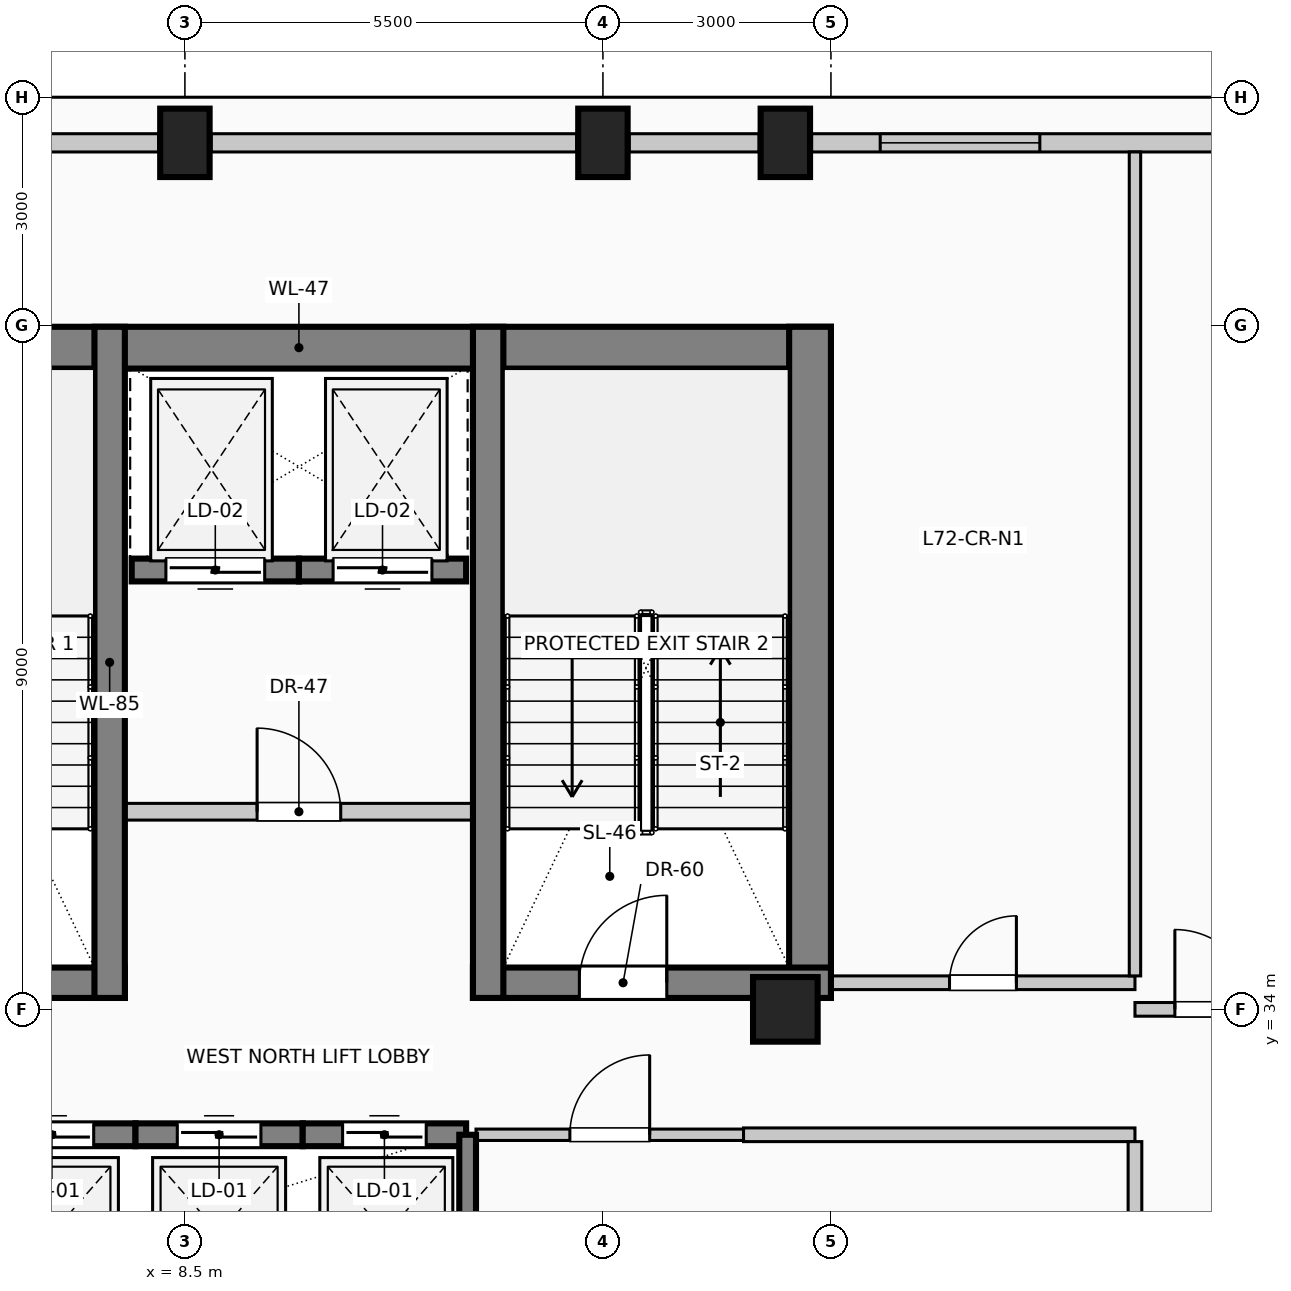
"""IFC4 building model, lengths in metres.
Left out: names, types, materials, properties, quantities, classifications, styles, units other than length and angle.
Written with IfcOpenShell. Run it as: python <this file> out.ifc"""

import sys

from ifc_helpers import new_model, si_unit, direction, frame, frame_2d, origin, origin_2d, place, context, subcontext, project, spatial, rectangle, circle, extrude, element, fill, save


model = new_model("IFC4")
c1 = context("Model", 3, precision=1e-05, world=origin(), true_north=direction((0.0, 1.0)))
c2 = subcontext(c1, "Body", "Model", "MODEL_VIEW")
j1 = project(units=[si_unit("LENGTHUNIT", "METRE"), si_unit("PLANEANGLEUNIT", "RADIAN")], contexts=[c1])
p1 = place(None, origin())
s1 = spatial("IfcSite", under=j1, at=p1, CompositionType="ELEMENT")
p2 = place(p1, origin())
s2 = spatial("IfcBuilding", under=s1, at=p2, CompositionType="ELEMENT")
p3 = place(p2, frame((0.0, 0.0, 297.0)))
s3 = spatial("IfcBuildingStorey", under=s2, at=p3, CompositionType="ELEMENT", Elevation=297.0)
p4 = place(p3, frame((3.0, 42.705, 0.0), z_axis=(0.0, 0.0, 1.0), x_axis=(1.0, 0.0, 0.0)))
e1 = element("IfcWall", 1, at=p4, inside=s3, PredefinedType="SHEAR", context=c2, shape_type="SweptSolid", body=[
    extrude(rectangle(XDim=14.0, YDim=0.55, at=frame_2d((7.0, 0.0))), origin(), (0.0, 0.0, 1.0), 4.0),
])
p5 = place(p3, frame((16.725, 34.15, 0.0), z_axis=(0.0, 0.0, 1.0), x_axis=(0.0, 1.0, 0.0)))
e2 = element("IfcWall", 2, at=p5, inside=s3, PredefinedType="SHEAR", context=c2, shape_type="SweptSolid", body=[
    extrude(rectangle(XDim=8.83, YDim=0.55, at=frame_2d((4.415, 0.0))), origin(), (0.0, 0.0, 1.0), 4.0),
])
p6 = place(p3, frame((3.0, 34.35, 0.0), z_axis=(0.0, 0.0, 1.0), x_axis=(1.0, 0.0, 0.0)))
e3 = element("IfcWall", 3, at=p6, inside=s3, PredefinedType="SHEAR", context=c2, shape_type="SweptSolid", body=[
    extrude(rectangle(XDim=4.71, YDim=0.4, at=frame_2d((2.355, 0.0))), origin(), (0.0, 0.0, 1.0), 4.0),
])
p7 = place(p6, frame((2.4, 0.0, 0.0)))
e4 = element("IfcOpeningElement", 4, at=p7, cuts=e3, PredefinedType="OPENING", context=c2, shape_type="SweptSolid", body=[
    extrude(rectangle(XDim=1.15, YDim=2.2, at=frame_2d((0.575, 1.1))), frame((0.0, 0.21, 0.0), z_axis=(0.0, -1.0, 0.0), x_axis=(1.0, 0.0, 0.0)), (0.0, 0.0, 1.0), 0.42),
])
p8 = place(p3, frame((12.29, 34.35, 0.0), z_axis=(0.0, 0.0, 1.0), x_axis=(1.0, 0.0, 0.0)))
e5 = element("IfcWall", 5, at=p8, inside=s3, PredefinedType="SHEAR", context=c2, shape_type="SweptSolid", body=[
    extrude(rectangle(XDim=4.71, YDim=0.4, at=frame_2d((2.355, 0.0))), origin(), (0.0, 0.0, 1.0), 4.0),
])
p9 = place(p8, frame((1.4, 0.0, 0.0)))
e6 = element("IfcOpeningElement", 6, at=p9, cuts=e5, PredefinedType="OPENING", context=c2, shape_type="SweptSolid", body=[
    extrude(rectangle(XDim=1.15, YDim=2.2, at=frame_2d((0.575, 1.1))), frame((0.0, 0.21, 0.0), z_axis=(0.0, -1.0, 0.0), x_axis=(1.0, 0.0, 0.0)), (0.0, 0.0, 1.0), 0.42),
])
for number, where, z_axis, x_axis in (
    (7, (7.51, 34.15, 0.0), (0.0, 0.0, 1.0), (0.0, 1.0, 0.0)),
    (8, (12.49, 34.15, 0.0), (0.0, 0.0, 1.0), (0.0, 1.0, 0.0)),
):
    element("IfcWall", number, at=place(p3, frame(where, z_axis=z_axis, x_axis=x_axis)), inside=s3, PredefinedType="SHEAR", context=c2, shape_type="SweptSolid", body=[
        extrude(rectangle(XDim=8.83, YDim=0.4, at=frame_2d((4.415, 0.0))), origin(), (0.0, 0.0, 1.0), 4.0),
    ])
for number, where, z_axis, x_axis in (
    (9, (8.5, 45.4, 0.0), (0.0, 0.0, 1.0), (1.0, 0.0, 0.0)),
    (10, (14.0, 45.4, 0.0), (0.0, 0.0, 1.0), (1.0, 0.0, 0.0)),
    (11, (16.4, 45.4, 0.0), (0.0, 0.0, 1.0), (1.0, 0.0, 0.0)),
):
    element("IfcColumn", number, at=place(p3, frame(where, z_axis=z_axis, x_axis=x_axis)), inside=s3, PredefinedType="COLUMN", context=c2, shape_type="SweptSolid", body=[
        extrude(rectangle(XDim=0.65, YDim=0.9, at=origin_2d()), origin(), (0.0, 0.0, 1.0), 4.0),
    ])
p10 = place(p3, frame((16.4, 34.0, 0.0), z_axis=(0.0, 0.0, 1.0), x_axis=(1.0, 0.0, 0.0)))
e12 = element("IfcColumn", 12, at=p10, inside=s3, PredefinedType="COLUMN", context=c2, shape_type="SweptSolid", body=[
    extrude(circle(Radius=0.425, at=origin_2d()), origin(), (0.0, 0.0, 1.0), 4.0),
])
p11 = place(p3, frame((3.945, 45.4, 0.0), z_axis=(0.0, 0.0, 1.0), x_axis=(1.0, 0.0, 0.0)))
e13 = element("IfcWall", 13, at=p11, inside=s3, PredefinedType="SOLIDWALL", context=c2, shape_type="SweptSolid", body=[
    extrude(rectangle(XDim=4.21, YDim=0.24, at=frame_2d((2.105, 0.0))), origin(), (0.0, 0.0, 1.0), 3.025),
])
p12 = place(p3, frame((8.845, 45.4, 0.0), z_axis=(0.0, 0.0, 1.0), x_axis=(1.0, 0.0, 0.0)))
e14 = element("IfcWall", 14, at=p12, inside=s3, PredefinedType="SOLIDWALL", context=c2, shape_type="SweptSolid", body=[
    extrude(rectangle(XDim=4.81, YDim=0.24, at=frame_2d((2.405, 0.0))), origin(), (0.0, 0.0, 1.0), 3.025),
])
p13 = place(p3, frame((14.345, 45.4, 0.0), z_axis=(0.0, 0.0, 1.0), x_axis=(1.0, 0.0, 0.0)))
e15 = element("IfcWall", 15, at=p13, inside=s3, PredefinedType="SOLIDWALL", context=c2, shape_type="SweptSolid", body=[
    extrude(rectangle(XDim=1.71, YDim=0.24, at=frame_2d((0.855, 0.0))), origin(), (0.0, 0.0, 1.0), 3.025),
])
p14 = place(p3, frame((16.745, 45.4, 0.0), z_axis=(0.0, 0.0, 1.0), x_axis=(1.0, 0.0, 0.0)))
e16 = element("IfcWall", 16, at=p14, inside=s3, PredefinedType="SOLIDWALL", context=c2, shape_type="SweptSolid", body=[
    extrude(rectangle(XDim=6.91, YDim=0.24, at=frame_2d((3.455, 0.0))), origin(), (0.0, 0.0, 1.0), 3.025),
])
p15 = place(p14, frame((0.903, 0.0, 0.35)))
e17 = element("IfcOpeningElement", 17, at=p15, cuts=e16, PredefinedType="OPENING", context=c2, shape_type="SweptSolid", body=[
    extrude(rectangle(XDim=2.1, YDim=2.2, at=frame_2d((1.05, 1.1))), frame((0.0, 0.13, 0.0), z_axis=(0.0, -1.0, 0.0), x_axis=(1.0, 0.0, 0.0)), (0.0, 0.0, 1.0), 0.26),
])
p16 = place(p3, frame((5.65, 32.35, 0.0), z_axis=(0.0, 0.0, 1.0), x_axis=(1.0, 0.0, 0.0)))
e18 = element("IfcWall", 18, at=p16, inside=s3, PredefinedType="SOLIDWALL", context=c2, shape_type="SweptSolid", body=[
    extrude(rectangle(XDim=2.2, YDim=0.3, at=frame_2d((1.1, 0.0))), origin(), (0.0, 0.0, 1.0), 4.0),
])
p17 = place(p16, frame((0.55, 0.0, 0.0)))
e19 = element("IfcOpeningElement", 19, at=p17, cuts=e18, PredefinedType="OPENING", context=c2, shape_type="SweptSolid", body=[
    extrude(rectangle(XDim=1.1, YDim=2.2, at=frame_2d((0.55, 1.1))), frame((0.0, 0.16, 0.0), z_axis=(0.0, -1.0, 0.0), x_axis=(1.0, 0.0, 0.0)), (0.0, 0.0, 1.0), 0.32),
])
p18 = place(p3, frame((7.85, 32.35, 0.0), z_axis=(0.0, 0.0, 1.0), x_axis=(1.0, 0.0, 0.0)))
e20 = element("IfcWall", 20, at=p18, inside=s3, PredefinedType="SOLIDWALL", context=c2, shape_type="SweptSolid", body=[
    extrude(rectangle(XDim=2.2, YDim=0.3, at=frame_2d((1.1, 0.0))), origin(), (0.0, 0.0, 1.0), 4.0),
])
p19 = place(p18, frame((0.55, 0.0, 0.0)))
e21 = element("IfcOpeningElement", 21, at=p19, cuts=e20, PredefinedType="OPENING", context=c2, shape_type="SweptSolid", body=[
    extrude(rectangle(XDim=1.1, YDim=2.2, at=frame_2d((0.55, 1.1))), frame((0.0, 0.16, 0.0), z_axis=(0.0, -1.0, 0.0), x_axis=(1.0, 0.0, 0.0)), (0.0, 0.0, 1.0), 0.32),
])
p20 = place(p3, frame((10.05, 32.35, 0.0), z_axis=(0.0, 0.0, 1.0), x_axis=(1.0, 0.0, 0.0)))
e22 = element("IfcWall", 22, at=p20, inside=s3, PredefinedType="SOLIDWALL", context=c2, shape_type="SweptSolid", body=[
    extrude(rectangle(XDim=2.15, YDim=0.3, at=frame_2d((1.075, 0.0))), origin(), (0.0, 0.0, 1.0), 4.0),
])
p21 = place(p20, frame((0.525, 0.0, 0.0)))
e23 = element("IfcOpeningElement", 23, at=p21, cuts=e22, PredefinedType="OPENING", context=c2, shape_type="SweptSolid", body=[
    extrude(rectangle(XDim=1.1, YDim=2.2, at=frame_2d((0.55, 1.1))), frame((0.0, 0.16, 0.0), z_axis=(0.0, -1.0, 0.0), x_axis=(1.0, 0.0, 0.0)), (0.0, 0.0, 1.0), 0.32),
])
p22 = place(p3, frame((10.0, 39.78, 0.0), z_axis=(0.0, 0.0, 1.0), x_axis=(-1.0, 0.0, 0.0)))
e24 = element("IfcWall", 24, at=p22, inside=s3, PredefinedType="SOLIDWALL", context=c2, shape_type="SweptSolid", body=[
    extrude(rectangle(XDim=2.2, YDim=0.3, at=frame_2d((1.1, 0.0))), origin(), (0.0, 0.0, 1.0), 4.0),
])
p23 = place(p22, frame((0.45, 0.0, 0.0)))
e25 = element("IfcOpeningElement", 25, at=p23, cuts=e24, PredefinedType="OPENING", context=c2, shape_type="SweptSolid", body=[
    extrude(rectangle(XDim=1.3, YDim=2.25, at=frame_2d((0.65, 1.125))), frame((0.0, 0.16, 0.0), z_axis=(0.0, -1.0, 0.0), x_axis=(1.0, 0.0, 0.0)), (0.0, 0.0, 1.0), 0.32),
])
p24 = place(p3, frame((12.2, 39.78, 0.0), z_axis=(0.0, 0.0, 1.0), x_axis=(-1.0, 0.0, 0.0)))
e26 = element("IfcWall", 26, at=p24, inside=s3, PredefinedType="SOLIDWALL", context=c2, shape_type="SweptSolid", body=[
    extrude(rectangle(XDim=2.2, YDim=0.3, at=frame_2d((1.1, 0.0))), origin(), (0.0, 0.0, 1.0), 4.0),
])
p25 = place(p24, frame((0.45, 0.0, 0.0)))
e27 = element("IfcOpeningElement", 27, at=p25, cuts=e26, PredefinedType="OPENING", context=c2, shape_type="SweptSolid", body=[
    extrude(rectangle(XDim=1.3, YDim=2.25, at=frame_2d((0.65, 1.125))), frame((0.0, 0.16, 0.0), z_axis=(0.0, -1.0, 0.0), x_axis=(1.0, 0.0, 0.0)), (0.0, 0.0, 1.0), 0.32),
])
p26 = place(p3, frame((12.22, 29.75, 0.0), z_axis=(0.0, 0.0, 1.0), x_axis=(0.0, 1.0, 0.0)))
e28 = element("IfcWall", 28, at=p26, inside=s3, PredefinedType="SOLIDWALL", context=c2, shape_type="SweptSolid", body=[
    extrude(rectangle(XDim=2.6, YDim=0.22, at=frame_2d((1.3, 0.0))), origin(), (0.0, 0.0, 1.0), 4.0),
])
p27 = place(p3, frame((7.51, 36.6, 0.0), z_axis=(0.0, 0.0, 1.0), x_axis=(1.0, 0.0, 0.0)))
e29 = element("IfcWall", 29, at=p27, inside=s3, PredefinedType="PARTITIONING", context=c2, shape_type="SweptSolid", body=[
    extrude(rectangle(XDim=4.98, YDim=0.22, at=frame_2d((2.49, 0.0))), origin(), (0.0, 0.0, 1.0), 3.775),
])
p28 = place(p27, frame((1.94, 0.0, 0.0)))
e30 = element("IfcOpeningElement", 30, at=p28, cuts=e29, PredefinedType="OPENING", context=c2, shape_type="SweptSolid", body=[
    extrude(rectangle(XDim=1.1, YDim=2.2, at=frame_2d((0.55, 1.1))), frame((0.0, 0.12, 0.0), z_axis=(0.0, -1.0, 0.0), x_axis=(1.0, 0.0, 0.0)), (0.0, 0.0, 1.0), 0.24),
])
p29 = place(p3, frame((12.33, 32.35, 0.0), z_axis=(0.0, 0.0, 1.0), x_axis=(1.0, 0.0, 0.0)))
e31 = element("IfcWall", 31, at=p29, inside=s3, PredefinedType="PARTITIONING", context=c2, shape_type="SweptSolid", body=[
    extrude(rectangle(XDim=3.52, YDim=0.15, at=frame_2d((1.76, 0.0))), origin(), (0.0, 0.0, 1.0), 3.775),
])
p30 = place(p29, frame((1.235, 0.0, 0.0)))
e32 = element("IfcOpeningElement", 32, at=p30, cuts=e31, PredefinedType="OPENING", context=c2, shape_type="SweptSolid", body=[
    extrude(rectangle(XDim=1.05, YDim=2.15, at=frame_2d((0.525, 1.075))), frame((0.0, 0.085, 0.0), z_axis=(0.0, -1.0, 0.0), x_axis=(1.0, 0.0, 0.0)), (0.0, 0.0, 1.0), 0.17),
])
p31 = place(p3, frame((15.85, 32.35, 0.0), z_axis=(0.0, 0.0, 1.0), x_axis=(1.0, 0.0, 0.0)))
e33 = element("IfcWall", 33, at=p31, inside=s3, PredefinedType="PARTITIONING", context=c2, shape_type="SweptSolid", body=[
    extrude(rectangle(XDim=5.15, YDim=0.18, at=frame_2d((2.575, 0.0))), origin(), (0.0, 0.0, 1.0), 3.775),
])
p32 = place(p3, frame((21.0, 34.0, 0.0), z_axis=(0.0, 0.0, 1.0), x_axis=(1.0, 0.0, 0.0)))
e34 = element("IfcWall", 34, at=p32, inside=s3, PredefinedType="PARTITIONING", context=c2, shape_type="SweptSolid", body=[
    extrude(rectangle(XDim=2.1, YDim=0.18, at=frame_2d((1.05, 0.0))), origin(), (0.0, 0.0, 1.0), 3.27),
])
p33 = place(p32, frame((0.525, 0.0, 0.0)))
e35 = element("IfcOpeningElement", 35, at=p33, cuts=e34, PredefinedType="OPENING", context=c2, shape_type="SweptSolid", body=[
    extrude(rectangle(XDim=1.05, YDim=2.15, at=frame_2d((0.525, 1.075))), frame((0.0, 0.1, 0.0), z_axis=(0.0, -1.0, 0.0), x_axis=(1.0, 0.0, 0.0)), (0.0, 0.0, 1.0), 0.2),
])
p34 = place(p3, frame((17.0, 34.35, 0.0), z_axis=(0.0, 0.0, 1.0), x_axis=(1.0, 0.0, 0.0)))
e36 = element("IfcWall", 36, at=p34, inside=s3, PredefinedType="PARTITIONING", context=c2, shape_type="SweptSolid", body=[
    extrude(rectangle(XDim=4.0, YDim=0.18, at=frame_2d((2.0, 0.0))), origin(), (0.0, 0.0, 1.0), 3.775),
])
p35 = place(p34, frame((1.56, 0.0, 0.0)))
e37 = element("IfcOpeningElement", 37, at=p35, cuts=e36, PredefinedType="OPENING", context=c2, shape_type="SweptSolid", body=[
    extrude(rectangle(XDim=0.88, YDim=2.1, at=frame_2d((0.44, 1.05))), frame((0.0, 0.1, 0.0), z_axis=(0.0, -1.0, 0.0), x_axis=(1.0, 0.0, 0.0)), (0.0, 0.0, 1.0), 0.2),
])
p36 = place(p3, frame((21.0, 24.875, 0.0), z_axis=(0.0, 0.0, 1.0), x_axis=(0.0, 1.0, 0.0)))
e38 = element("IfcWall", 38, at=p36, inside=s3, PredefinedType="PARTITIONING", context=c2, shape_type="SweptSolid", body=[
    extrude(rectangle(XDim=7.385, YDim=0.18, at=frame_2d((3.692, 0.0))), origin(), (0.0, 0.0, 1.0), 3.775),
])
p37 = place(p3, frame((21.0, 34.44, 0.0), z_axis=(0.0, 0.0, 1.0), x_axis=(0.0, 1.0, 0.0)))
e39 = element("IfcWall", 39, at=p37, inside=s3, PredefinedType="PARTITIONING", context=c2, shape_type="SweptSolid", body=[
    extrude(rectangle(XDim=10.84, YDim=0.15, at=frame_2d((5.42, 0.0))), origin(), (0.0, 0.0, 1.0), 3.775),
])
p38 = place(p15, origin())
e40 = element("IfcWindow", 40, at=p38, inside=s3, PartitioningType="SINGLE_PANEL", PredefinedType="WINDOW", context=c2, shape_type="SweptSolid", body=[
    extrude(rectangle(XDim=2.1, YDim=2.2, at=frame_2d((1.05, 1.1))), frame((0.0, 0.03, 0.0), z_axis=(0.0, -1.0, 0.0), x_axis=(1.0, 0.0, 0.0)), (0.0, 0.0, 1.0), 0.06),
])
fill(e17, e40)
p39 = place(p17, origin())
e41 = element("IfcDoor", 41, at=p39, inside=s3, OperationType="SLIDING_TO_RIGHT", PredefinedType="DOOR", context=c2, shape_type="SweptSolid", body=[
    extrude(rectangle(XDim=1.1, YDim=2.2, at=frame_2d((0.55, 1.1))), frame((0.0, 0.025, 0.0), z_axis=(0.0, -1.0, 0.0), x_axis=(1.0, 0.0, 0.0)), (0.0, 0.0, 1.0), 0.05),
])
fill(e19, e41)
p40 = place(p19, origin())
e42 = element("IfcDoor", 42, at=p40, inside=s3, OperationType="SLIDING_TO_LEFT", PredefinedType="DOOR", context=c2, shape_type="SweptSolid", body=[
    extrude(rectangle(XDim=1.1, YDim=2.2, at=frame_2d((0.55, 1.1))), frame((0.0, 0.025, 0.0), z_axis=(0.0, -1.0, 0.0), x_axis=(1.0, 0.0, 0.0)), (0.0, 0.0, 1.0), 0.05),
])
fill(e21, e42)
p41 = place(p21, origin())
e43 = element("IfcDoor", 43, at=p41, inside=s3, OperationType="SLIDING_TO_RIGHT", PredefinedType="DOOR", context=c2, shape_type="SweptSolid", body=[
    extrude(rectangle(XDim=1.1, YDim=2.2, at=frame_2d((0.55, 1.1))), frame((0.0, 0.025, 0.0), z_axis=(0.0, -1.0, 0.0), x_axis=(1.0, 0.0, 0.0)), (0.0, 0.0, 1.0), 0.05),
])
fill(e23, e43)
p42 = place(p23, origin())
e44 = element("IfcDoor", 44, at=p42, inside=s3, OperationType="SLIDING_TO_LEFT", PredefinedType="DOOR", context=c2, shape_type="SweptSolid", body=[
    extrude(rectangle(XDim=1.3, YDim=2.25, at=frame_2d((0.65, 1.125))), frame((0.0, 0.025, 0.0), z_axis=(0.0, -1.0, 0.0), x_axis=(1.0, 0.0, 0.0)), (0.0, 0.0, 1.0), 0.05),
])
fill(e25, e44)
p43 = place(p25, origin())
e45 = element("IfcDoor", 45, at=p43, inside=s3, OperationType="SLIDING_TO_RIGHT", PredefinedType="DOOR", context=c2, shape_type="SweptSolid", body=[
    extrude(rectangle(XDim=1.3, YDim=2.25, at=frame_2d((0.65, 1.125))), frame((0.0, 0.025, 0.0), z_axis=(0.0, -1.0, 0.0), x_axis=(1.0, 0.0, 0.0)), (0.0, 0.0, 1.0), 0.05),
])
fill(e27, e45)
p44 = place(p9, origin())
e46 = element("IfcDoor", 46, at=p44, inside=s3, OperationType="SINGLE_SWING_RIGHT", PredefinedType="DOOR", context=c2, shape_type="SweptSolid", body=[
    extrude(rectangle(XDim=1.15, YDim=2.2, at=frame_2d((0.575, 1.1))), frame((0.0, 0.025, 0.0), z_axis=(0.0, -1.0, 0.0), x_axis=(1.0, 0.0, 0.0)), (0.0, 0.0, 1.0), 0.05),
])
fill(e6, e46)
p45 = place(p28, origin())
e47 = element("IfcDoor", 47, at=p45, inside=s3, OperationType="SINGLE_SWING_LEFT", PredefinedType="DOOR", context=c2, shape_type="SweptSolid", body=[
    extrude(rectangle(XDim=1.1, YDim=2.2, at=frame_2d((0.55, 1.1))), frame((0.0, 0.025, 0.0), z_axis=(0.0, -1.0, 0.0), x_axis=(1.0, 0.0, 0.0)), (0.0, 0.0, 1.0), 0.05),
])
fill(e30, e47)
p46 = place(p30, origin())
e48 = element("IfcDoor", 48, at=p46, inside=s3, OperationType="SINGLE_SWING_RIGHT", PredefinedType="DOOR", context=c2, shape_type="SweptSolid", body=[
    extrude(rectangle(XDim=1.05, YDim=2.15, at=frame_2d((0.525, 1.075))), frame((0.0, 0.025, 0.0), z_axis=(0.0, -1.0, 0.0), x_axis=(1.0, 0.0, 0.0)), (0.0, 0.0, 1.0), 0.05),
])
fill(e32, e48)
p47 = place(p33, origin())
e49 = element("IfcDoor", 49, at=p47, inside=s3, OperationType="SINGLE_SWING_LEFT", PredefinedType="DOOR", context=c2, shape_type="SweptSolid", body=[
    extrude(rectangle(XDim=1.05, YDim=2.15, at=frame_2d((0.525, 1.075))), frame((0.0, 0.025, 0.0), z_axis=(0.0, -1.0, 0.0), x_axis=(1.0, 0.0, 0.0)), (0.0, 0.0, 1.0), 0.05),
])
fill(e35, e49)
p48 = place(p35, origin())
e50 = element("IfcDoor", 50, at=p48, inside=s3, OperationType="SINGLE_SWING_RIGHT", PredefinedType="DOOR", context=c2, shape_type="SweptSolid", body=[
    extrude(rectangle(XDim=0.88, YDim=2.1, at=frame_2d((0.44, 1.05))), frame((0.0, 0.025, 0.0), z_axis=(0.0, -1.0, 0.0), x_axis=(1.0, 0.0, 0.0)), (0.0, 0.0, 1.0), 0.05),
])
fill(e37, e50)
save(model, sys.argv[1])
